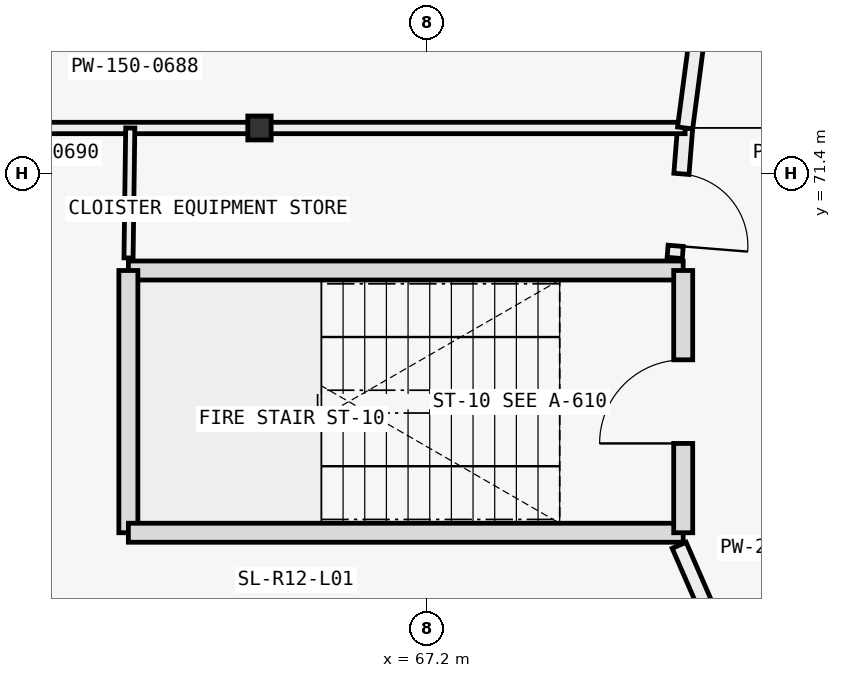
"""IFC4 building model, lengths in metres.
Left out: names, types, materials, properties, quantities, classifications, styles, units other than length and angle.
Written with IfcOpenShell. Run it as: python <this file> out.ifc"""

import sys

from ifc_helpers import new_model, si_unit, direction, frame, frame_2d, origin, origin_2d, place, context, subcontext, project, spatial, rectangle, i_section, extrude, element, fill, save


model = new_model("IFC4")
c1 = context("Model", 3, precision=1e-05, world=origin(), true_north=direction((0.0, 1.0)))
c2 = subcontext(c1, "Body", "Model", "MODEL_VIEW")
j1 = project(units=[si_unit("LENGTHUNIT", "METRE"), si_unit("PLANEANGLEUNIT", "RADIAN")], contexts=[c1])
p1 = place(None, origin())
s1 = spatial("IfcSite", under=j1, at=p1, CompositionType="ELEMENT")
p2 = place(p1, origin())
s2 = spatial("IfcBuilding", under=s1, at=p2, CompositionType="ELEMENT")
p3 = place(p2, frame((0.0, 0.0, 5.4)))
s3 = spatial("IfcBuildingStorey", under=s2, at=p3, CompositionType="ELEMENT", Elevation=5.4)
p4 = place(p3, frame((65.0, 72.0, 0.0), z_axis=(0.0, 0.0, 1.0), x_axis=(1.0, 0.0, 0.0)))
e1 = element("IfcColumn", 1, at=p4, inside=s3, PredefinedType="COLUMN", context=c2, shape_type="SweptSolid", body=[
    extrude(i_section(OverallWidth=0.307, OverallDepth=0.315, WebThickness=0.012, FlangeThickness=0.019, FilletRadius=0.017, at=origin_2d()), origin(), (0.0, 0.0, 1.0), 4.2),
])
p5 = place(p3, frame((70.575, 70.125, 0.0), z_axis=(0.0, 0.0, 1.0), x_axis=(-1.0, 0.0, 0.0)))
e2 = element("IfcWall", 2, at=p5, inside=s3, PredefinedType="SOLIDWALL", context=c2, shape_type="SweptSolid", body=[
    extrude(rectangle(XDim=7.3, YDim=0.25, at=frame_2d((3.65, 0.0))), origin(), (0.0, 0.0, 1.0), 3.92),
])
p6 = place(p3, frame((63.275, 70.125, 0.0), z_axis=(0.0, 0.0, 1.0), x_axis=(0.0, -1.0, 0.0)))
e3 = element("IfcWall", 3, at=p6, inside=s3, PredefinedType="SOLIDWALL", context=c2, shape_type="SweptSolid", body=[
    extrude(rectangle(XDim=3.45, YDim=0.25, at=frame_2d((1.725, 0.0))), origin(), (0.0, 0.0, 1.0), 3.92),
])
p7 = place(p3, frame((63.275, 66.675, 0.0), z_axis=(0.0, 0.0, 1.0), x_axis=(1.0, 0.0, 0.0)))
e4 = element("IfcWall", 4, at=p7, inside=s3, PredefinedType="SOLIDWALL", context=c2, shape_type="SweptSolid", body=[
    extrude(rectangle(XDim=7.3, YDim=0.25, at=frame_2d((3.65, 0.0))), origin(), (0.0, 0.0, 1.0), 3.92),
])
p8 = place(p3, frame((70.575, 66.675, 0.0), z_axis=(0.0, 0.0, 1.0), x_axis=(0.0, 1.0, 0.0)))
e5 = element("IfcWall", 5, at=p8, inside=s3, PredefinedType="SOLIDWALL", context=c2, shape_type="SweptSolid", body=[
    extrude(rectangle(XDim=3.45, YDim=0.25, at=frame_2d((1.725, 0.0))), origin(), (0.0, 0.0, 1.0), 3.92),
])
p9 = place(p8, frame((1.175, 0.0, 0.0)))
e6 = element("IfcOpeningElement", 6, at=p9, cuts=e5, PredefinedType="OPENING", context=c2, shape_type="SweptSolid", body=[
    extrude(rectangle(XDim=1.1, YDim=2.2, at=frame_2d((0.55, 1.1))), frame((0.0, 0.135, 0.0), z_axis=(0.0, -1.0, 0.0), x_axis=(1.0, 0.0, 0.0)), (0.0, 0.0, 1.0), 0.27),
])
p10 = place(p3, frame((70.6, 72.0, 0.0), z_axis=(0.0, 0.0, 1.0), x_axis=(-0.07984138391, -0.996807580938, 0.0)))
e7 = element("IfcWall", 7, at=p10, inside=s3, PredefinedType="PARTITIONING", context=c2, shape_type="SweptSolid", body=[
    extrude(rectangle(XDim=1.715, YDim=0.2, at=frame_2d((0.858, 0.0))), origin(), (0.0, 0.0, 1.0), 3.372),
])
p11 = place(p10, frame((0.605, 0.0, 0.0)))
e8 = element("IfcOpeningElement", 8, at=p11, cuts=e7, PredefinedType="OPENING", context=c2, shape_type="SweptSolid", body=[
    extrude(rectangle(XDim=0.95, YDim=2.1, at=frame_2d((0.475, 1.05))), frame((0.0, 0.11, 0.0), z_axis=(0.0, -1.0, 0.0), x_axis=(1.0, 0.0, 0.0)), (0.0, 0.0, 1.0), 0.22),
])
p12 = place(p3, frame((70.522, 66.51, 0.0), z_axis=(0.0, 0.0, 1.0), x_axis=(0.399219580964, -0.916855346374, 0.0)))
e9 = element("IfcWall", 9, at=p12, inside=s3, PredefinedType="PARTITIONING", context=c2, shape_type="SweptSolid", body=[
    extrude(rectangle(XDim=2.876, YDim=0.2, at=frame_2d((1.438, 0.0))), origin(), (0.0, 0.0, 1.0), 3.372),
])
p13 = place(p12, frame((1.17, 0.0, 0.0)))
e10 = element("IfcOpeningElement", 10, at=p13, cuts=e9, PredefinedType="OPENING", context=c2, shape_type="SweptSolid", body=[
    extrude(rectangle(XDim=1.4, YDim=2.2, at=frame_2d((0.7, 1.1))), frame((0.0, 0.11, 0.0), z_axis=(0.0, -1.0, 0.0), x_axis=(1.0, 0.0, 0.0)), (0.0, 0.0, 1.0), 0.22),
])
p14 = place(p3, frame((70.6, 72.0, 0.0), z_axis=(0.0, 0.0, 1.0), x_axis=(-1.0, 0.0, 0.0)))
e11 = element("IfcWall", 11, at=p14, inside=s3, PredefinedType="PARTITIONING", context=c2, shape_type="SweptSolid", body=[
    extrude(rectangle(XDim=14.48, YDim=0.15, at=frame_2d((7.24, 0.0))), origin(), (0.0, 0.0, 1.0), 3.367),
])
p15 = place(p3, frame((63.277, 70.29, 0.0), z_axis=(0.0, 0.0, 1.0), x_axis=(0.013419693814, 0.999909951855, 0.0)))
e12 = element("IfcWall", 12, at=p15, inside=s3, PredefinedType="PARTITIONING", context=c2, shape_type="SweptSolid", body=[
    extrude(rectangle(XDim=1.71, YDim=0.12, at=frame_2d((0.855, 0.0))), origin(), (0.0, 0.0, 1.0), 3.367),
])
p16 = place(p3, frame((71.67, 80.127, 0.0), z_axis=(0.0, 0.0, 1.0), x_axis=(-0.130513066404, -0.991446589332, 0.0)))
e13 = element("IfcWall", 13, at=p16, inside=s3, PredefinedType="PARTITIONING", context=c2, shape_type="SweptSolid", body=[
    extrude(rectangle(XDim=8.197, YDim=0.2, at=frame_2d((4.099, 0.0))), origin(), (0.0, 0.0, 1.0), 3.372),
])
p17 = place(p9, origin())
e14 = element("IfcDoor", 14, at=p17, inside=s3, OperationType="SINGLE_SWING_LEFT", PredefinedType="DOOR", context=c2, shape_type="SweptSolid", body=[
    extrude(rectangle(XDim=1.1, YDim=2.2, at=frame_2d((0.55, 1.1))), frame((0.0, 0.025, 0.0), z_axis=(0.0, -1.0, 0.0), x_axis=(1.0, 0.0, 0.0)), (0.0, 0.0, 1.0), 0.05),
])
fill(e6, e14)
p18 = place(p11, origin())
e15 = element("IfcDoor", 15, at=p18, inside=s3, OperationType="SINGLE_SWING_RIGHT", PredefinedType="DOOR", context=c2, shape_type="SweptSolid", body=[
    extrude(rectangle(XDim=0.95, YDim=2.1, at=frame_2d((0.475, 1.05))), frame((0.0, 0.025, 0.0), z_axis=(0.0, -1.0, 0.0), x_axis=(1.0, 0.0, 0.0)), (0.0, 0.0, 1.0), 0.05),
])
fill(e8, e15)
save(model, sys.argv[1])
